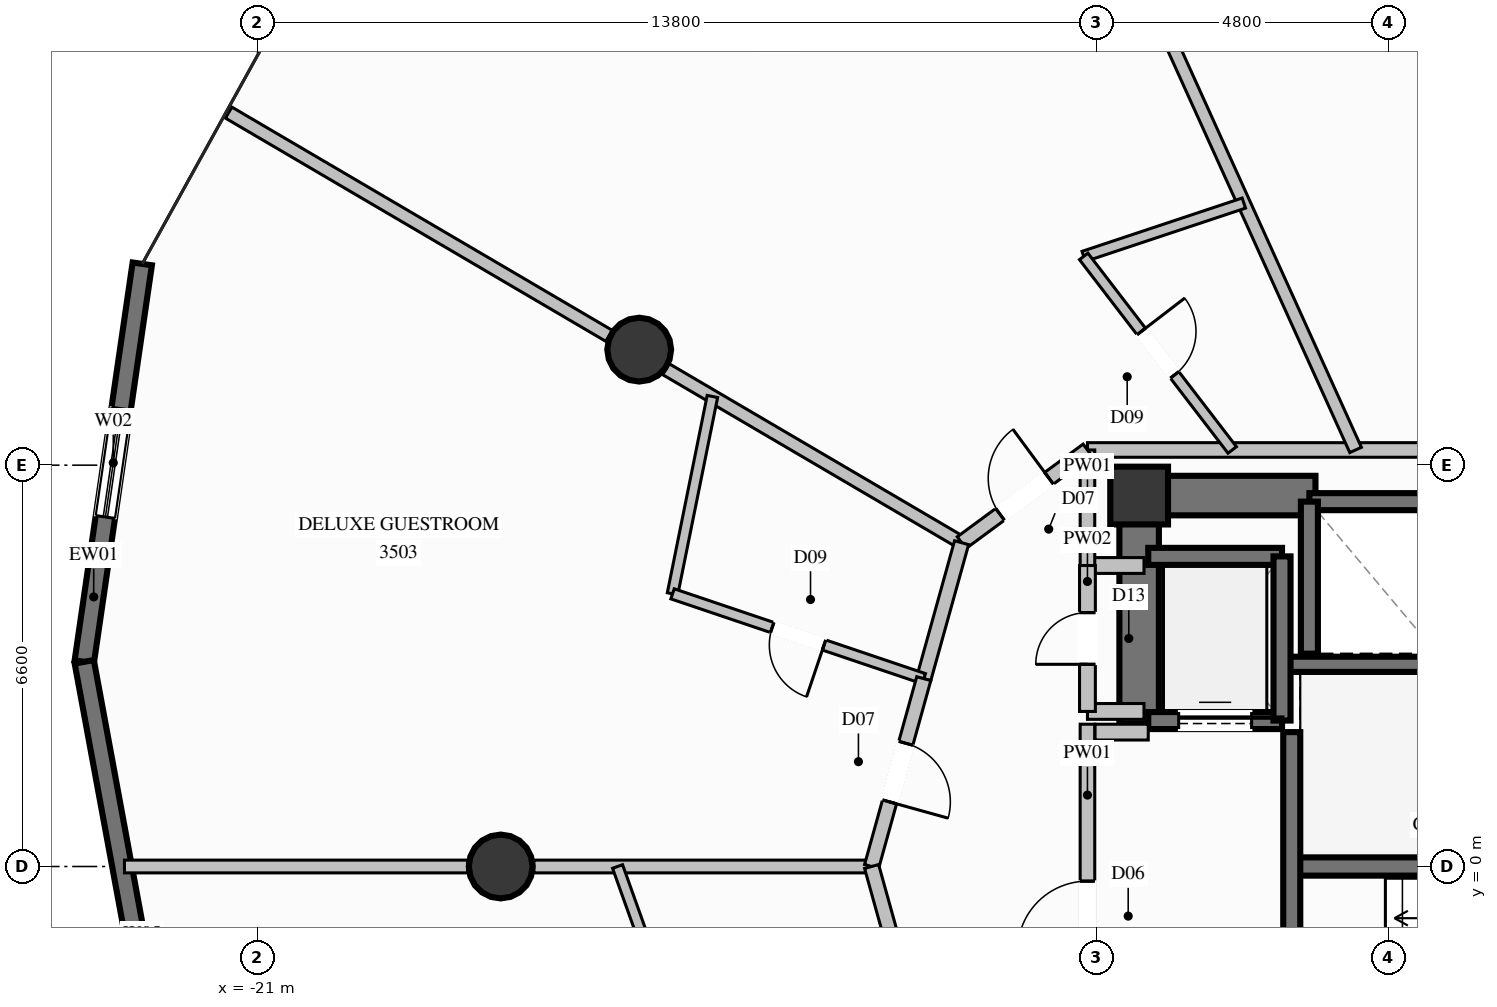
"""IFC4 building model, lengths in metres.
Left out: names, types, materials, properties, quantities, classifications, styles, units other than length and angle.
Written with IfcOpenShell. Run it as: python <this file> out.ifc"""

import sys

from ifc_helpers import new_model, si_unit, direction, frame, frame_2d, origin, origin_2d, place, context, subcontext, project, spatial, rectangle, circle, extrude, element, fill, save


model = new_model("IFC4")
c1 = context("Model", 3, precision=1e-05, world=origin(), true_north=direction((0.0, 1.0)))
c2 = subcontext(c1, "Body", "Model", "MODEL_VIEW")
j1 = project(units=[si_unit("LENGTHUNIT", "METRE"), si_unit("PLANEANGLEUNIT", "RADIAN")], contexts=[c1])
p1 = place(None, origin())
s1 = spatial("IfcSite", under=j1, at=p1, CompositionType="ELEMENT")
p2 = place(p1, origin())
s2 = spatial("IfcBuilding", under=s1, at=p2, CompositionType="ELEMENT")
p3 = place(p2, frame((0.0, 0.0, 131.4)))
s3 = spatial("IfcBuildingStorey", under=s2, at=p3, CompositionType="ELEMENT", Elevation=131.4)
p4 = place(p3, frame((-6.5, 6.1, 0.0), z_axis=(0.0, 0.0, 1.0), x_axis=(1.0, 0.0, 0.0)))
e1 = element("IfcColumn", 1, at=p4, inside=s3, PredefinedType="COLUMN", context=c2, shape_type="SweptSolid", body=[
    extrude(rectangle(XDim=0.95, YDim=0.95, at=origin_2d()), origin(), (0.0, 0.0, 1.0), 3.6),
])
p5 = place(p3, frame((-3.99, 0.0, 0.0), z_axis=(0.0, 0.0, 1.0), x_axis=(1.0, 0.0, 0.0)))
e2 = element("IfcWall", 2, at=p5, inside=s3, PredefinedType="SHEAR", context=c2, shape_type="SweptSolid", body=[
    extrude(rectangle(XDim=7.98, YDim=0.3, at=frame_2d((3.99, 0.0))), origin(), (0.0, 0.0, 1.0), 3.6),
])
p6 = place(p3, frame((-4.13, 3.325, 0.0), z_axis=(0.0, 0.0, 1.0), x_axis=(1.0, 0.0, 0.0)))
e3 = element("IfcWall", 3, at=p6, inside=s3, PredefinedType="SOLIDWALL", context=c2, shape_type="SweptSolid", body=[
    extrude(rectangle(XDim=8.26, YDim=0.25, at=frame_2d((4.13, 0.0))), origin(), (0.0, 0.0, 1.0), 3.6),
])
p7 = place(p3, frame((-6.175, 6.1, 0.0), z_axis=(0.0, 0.0, 1.0), x_axis=(1.0, 0.0, 0.0)))
e4 = element("IfcWall", 4, at=p7, inside=s3, PredefinedType="SHEAR", context=c2, shape_type="SweptSolid", body=[
    extrude(rectangle(XDim=2.575, YDim=0.65, at=frame_2d((1.288, 0.0))), origin(), (0.0, 0.0, 1.0), 3.6),
])
p8 = place(p3, frame((-6.5, 2.35, 0.0), z_axis=(0.0, 0.0, 1.0), x_axis=(0.0, 1.0, 0.0)))
e5 = element("IfcWall", 5, at=p8, inside=s3, PredefinedType="SHEAR", context=c2, shape_type="SweptSolid", body=[
    extrude(rectangle(XDim=4.075, YDim=0.65, at=frame_2d((2.038, 0.0))), origin(), (0.0, 0.0, 1.0), 3.6),
])
for number, where, z_axis, x_axis in (
    (6, (-14.722, 8.5, 0.0), (0.0, 0.0, 1.0), (1.0, 0.0, 0.0)),
    (7, (-17.0, 0.0, 0.0), (0.0, 0.0, 1.0), (1.0, 0.0, 0.0)),
):
    element("IfcColumn", number, at=place(p3, frame(where, z_axis=z_axis, x_axis=x_axis)), inside=s3, PredefinedType="COLUMN", context=c2, shape_type="SweptSolid", body=[
        extrude(circle(Radius=0.525, at=origin_2d()), origin(), (0.0, 0.0, 1.0), 3.6),
    ])
p9 = place(p3, frame((-23.849, 3.366, 0.0), z_axis=(0.0, 0.0, 1.0), x_axis=(0.144273756633, 0.989537812894, 0.0)))
e8 = element("IfcWall", 8, at=p9, inside=s3, PredefinedType="SOLIDWALL", context=c2, shape_type="SweptSolid", body=[
    extrude(rectangle(XDim=6.613, YDim=0.32, at=frame_2d((3.307, 0.0))), origin(), (0.0, 0.0, 1.0), 3.35),
])
p10 = place(p9, frame((2.407, 0.0, 0.35)))
e9 = element("IfcOpeningElement", 9, at=p10, cuts=e8, PredefinedType="OPENING", context=c2, shape_type="SweptSolid", body=[
    extrude(rectangle(XDim=1.8, YDim=2.6, at=frame_2d((0.9, 1.3))), frame((0.0, 0.17, 0.0), z_axis=(0.0, -1.0, 0.0), x_axis=(1.0, 0.0, 0.0)), (0.0, 0.0, 1.0), 0.34),
])
p11 = place(p3, frame((-22.58, -3.507, 0.0), z_axis=(0.0, 0.0, 1.0), x_axis=(-0.181571385037, 0.983377766749, 0.0)))
e10 = element("IfcWall", 10, at=p11, inside=s3, PredefinedType="SOLIDWALL", context=c2, shape_type="SweptSolid", body=[
    extrude(rectangle(XDim=6.989, YDim=0.32, at=frame_2d((3.495, 0.0))), origin(), (0.0, 0.0, 1.0), 3.35),
])
p12 = place(p11, frame((0.98, 0.0, 0.85)))
e11 = element("IfcOpeningElement", 11, at=p12, cuts=e10, PredefinedType="OPENING", context=c2, shape_type="SweptSolid", body=[
    extrude(rectangle(XDim=1.5, YDim=1.2, at=frame_2d((0.75, 0.6))), frame((0.0, 0.17, 0.0), z_axis=(0.0, -1.0, 0.0), x_axis=(1.0, 0.0, 0.0)), (0.0, 0.0, 1.0), 0.34),
])
p13 = place(p3, frame((-1.6, 6.0, 0.0), z_axis=(0.0, 0.0, 1.0), x_axis=(-1.0, 0.0, 0.0)))
e12 = element("IfcWall", 12, at=p13, inside=s3, PredefinedType="SOLIDWALL", context=c2, shape_type="SweptSolid", body=[
    extrude(rectangle(XDim=2.1, YDim=0.28, at=frame_2d((1.05, 0.0))), origin(), (0.0, 0.0, 1.0), 3.35),
])
p14 = place(p3, frame((-3.7, 6.0, 0.0), z_axis=(0.0, 0.0, 1.0), x_axis=(0.0, -1.0, 0.0)))
e13 = element("IfcWall", 13, at=p14, inside=s3, PredefinedType="SOLIDWALL", context=c2, shape_type="SweptSolid", body=[
    extrude(rectangle(XDim=2.5, YDim=0.28, at=frame_2d((1.25, 0.0))), origin(), (0.0, 0.0, 1.0), 3.35),
])
p15 = place(p3, frame((-6.35, 2.4, 0.0), z_axis=(0.0, 0.0, 1.0), x_axis=(1.0, 0.0, 0.0)))
e14 = element("IfcWall", 14, at=p15, inside=s3, PredefinedType="SOLIDWALL", context=c2, shape_type="SweptSolid", body=[
    extrude(rectangle(XDim=2.2, YDim=0.28, at=frame_2d((1.1, 0.0))), origin(), (0.0, 0.0, 1.0), 3.35),
])
p16 = place(p15, frame((0.5, 0.0, 0.0)))
e15 = element("IfcOpeningElement", 15, at=p16, cuts=e14, PredefinedType="OPENING", context=c2, shape_type="SweptSolid", body=[
    extrude(rectangle(XDim=1.2, YDim=2.2, at=frame_2d((0.6, 1.1))), frame((0.0, 0.15, 0.0), z_axis=(0.0, -1.0, 0.0), x_axis=(1.0, 0.0, 0.0)), (0.0, 0.0, 1.0), 0.3),
])
p17 = place(p3, frame((-4.15, 5.1, 0.0), z_axis=(0.0, 0.0, 1.0), x_axis=(-1.0, 0.0, 0.0)))
e16 = element("IfcWall", 16, at=p17, inside=s3, PredefinedType="SOLIDWALL", context=c2, shape_type="SweptSolid", body=[
    extrude(rectangle(XDim=2.2, YDim=0.28, at=frame_2d((1.1, 0.0))), origin(), (0.0, 0.0, 1.0), 3.35),
])
p18 = place(p3, frame((-4.15, 2.4, 0.0), z_axis=(0.0, 0.0, 1.0), x_axis=(0.0, 1.0, 0.0)))
e17 = element("IfcWall", 17, at=p18, inside=s3, PredefinedType="SOLIDWALL", context=c2, shape_type="SweptSolid", body=[
    extrude(rectangle(XDim=2.7, YDim=0.28, at=frame_2d((1.35, 0.0))), origin(), (0.0, 0.0, 1.0), 3.35),
])
p19 = place(p3, frame((-3.99, -3.25, 0.0), z_axis=(0.0, 0.0, 1.0), x_axis=(0.0, 1.0, 0.0)))
e18 = element("IfcWall", 18, at=p19, inside=s3, PredefinedType="SOLIDWALL", context=c2, shape_type="SweptSolid", body=[
    extrude(rectangle(XDim=5.46, YDim=0.28, at=frame_2d((2.73, 0.0))), origin(), (0.0, 0.0, 1.0), 3.35),
])
p20 = place(p19, frame((0.937, 0.0, 0.0)))
e19 = element("IfcOpeningElement", 19, at=p20, cuts=e18, PredefinedType="OPENING", context=c2, shape_type="SweptSolid", body=[
    extrude(rectangle(XDim=1.2, YDim=2.2, at=frame_2d((0.6, 1.1))), frame((0.0, 0.15, 0.0), z_axis=(0.0, -1.0, 0.0), x_axis=(1.0, 0.0, 0.0)), (0.0, 0.0, 1.0), 0.3),
])
p21 = place(p3, frame((-7.35, -2.78, 0.0), z_axis=(0.0, 0.0, 1.0), x_axis=(0.0, 1.0, 0.0)))
e20 = element("IfcWall", 20, at=p21, inside=s3, PredefinedType="PARTITIONING", context=c2, shape_type="SweptSolid", body=[
    extrude(rectangle(XDim=5.12, YDim=0.24, at=frame_2d((2.56, 0.0))), origin(), (0.0, 0.0, 1.0), 2.435),
])
p22 = place(p21, frame((1.389, 0.0, 0.0)))
e21 = element("IfcOpeningElement", 21, at=p22, cuts=e20, PredefinedType="OPENING", context=c2, shape_type="SweptSolid", body=[
    extrude(rectangle(XDim=1.15, YDim=2.2, at=frame_2d((0.575, 1.1))), frame((0.0, 0.13, 0.0), z_axis=(0.0, -1.0, 0.0), x_axis=(1.0, 0.0, 0.0)), (0.0, 0.0, 1.0), 0.26),
])
p23 = place(p3, frame((-7.225, 2.21, 0.0), z_axis=(0.0, 0.0, 1.0), x_axis=(1.0, 0.0, 0.0)))
e22 = element("IfcWall", 22, at=p23, inside=s3, PredefinedType="PARTITIONING", context=c2, shape_type="SweptSolid", body=[
    extrude(rectangle(XDim=0.875, YDim=0.26, at=frame_2d((0.438, 0.0))), origin(), (0.0, 0.0, 1.0), 3.35),
])
for number, where, z_axis, x_axis in (
    (23, (-7.35, 4.95, 0.0), (0.0, 0.0, 1.0), (1.0, 0.0, 0.0)),
    (24, (-7.35, 2.55, 0.0), (0.0, 0.0, 1.0), (1.0, 0.0, 0.0)),
):
    element("IfcWall", number, at=place(p3, frame(where, z_axis=z_axis, x_axis=x_axis)), inside=s3, PredefinedType="PARTITIONING", context=c2, shape_type="SweptSolid", body=[
        extrude(rectangle(XDim=0.93, YDim=0.26, at=frame_2d((0.465, 0.0))), origin(), (0.0, 0.0, 1.0), 3.35),
    ])
p24 = place(p3, frame((-7.35, 2.55, 0.0), z_axis=(0.0, 0.0, 1.0), x_axis=(0.0, 1.0, 0.0)))
e25 = element("IfcWall", 25, at=p24, inside=s3, PredefinedType="PARTITIONING", context=c2, shape_type="SweptSolid", body=[
    extrude(rectangle(XDim=2.4, YDim=0.26, at=frame_2d((1.2, 0.0))), origin(), (0.0, 0.0, 1.0), 2.435),
])
p25 = place(p24, frame((0.775, 0.0, 0.0)))
e26 = element("IfcOpeningElement", 26, at=p25, cuts=e25, PredefinedType="OPENING", context=c2, shape_type="SweptSolid", body=[
    extrude(rectangle(XDim=0.85, YDim=2.05, at=frame_2d((0.425, 1.025))), frame((0.0, 0.14, 0.0), z_axis=(0.0, -1.0, 0.0), x_axis=(1.0, 0.0, 0.0)), (0.0, 0.0, 1.0), 0.28),
])
p26 = place(p3, frame((-7.35, 6.85, 0.0), z_axis=(0.0, 0.0, 1.0), x_axis=(1.0, 0.0, 0.0)))
e27 = element("IfcWall", 27, at=p26, inside=s3, PredefinedType="PARTITIONING", context=c2, shape_type="SweptSolid", body=[
    extrude(rectangle(XDim=14.7, YDim=0.24, at=frame_2d((7.35, 0.0))), origin(), (0.0, 0.0, 1.0), 2.435),
])
p27 = place(p3, frame((-7.35, 4.95, 0.0), z_axis=(0.0, 0.0, 1.0), x_axis=(0.0, 1.0, 0.0)))
e28 = element("IfcWall", 28, at=p27, inside=s3, PredefinedType="PARTITIONING", context=c2, shape_type="SweptSolid", body=[
    extrude(rectangle(XDim=1.9, YDim=0.24, at=frame_2d((0.95, 0.0))), origin(), (0.0, 0.0, 1.0), 2.435),
])
p28 = place(p3, frame((-9.42, 5.325, 0.0), z_axis=(0.0, 0.0, 1.0), x_axis=(-0.862477017481, 0.506096230293, 0.0)))
e29 = element("IfcWall", 29, at=p28, inside=s3, PredefinedType="PARTITIONING", context=c2, shape_type="SweptSolid", body=[
    extrude(rectangle(XDim=5.637, YDim=0.21, at=frame_2d((2.819, 0.0))), origin(), (0.0, 0.0, 1.0), 2.791),
])
p29 = place(p3, frame((-15.218, 8.727, 0.0), z_axis=(0.0, 0.0, 1.0), x_axis=(-0.862485729763, 0.50608138274, 0.0)))
e30 = element("IfcWall", 30, at=p29, inside=s3, PredefinedType="PARTITIONING", context=c2, shape_type="SweptSolid", body=[
    extrude(rectangle(XDim=7.254, YDim=0.21, at=frame_2d((3.627, 0.0))), origin(), (0.0, 0.0, 1.0), 3.35),
])
p30 = place(p3, frame((-10.9, 0.0, 0.0), z_axis=(0.0, 0.0, 1.0), x_axis=(-1.0, 0.0, 0.0)))
e31 = element("IfcWall", 31, at=p30, inside=s3, PredefinedType="PARTITIONING", context=c2, shape_type="SweptSolid", body=[
    extrude(rectangle(XDim=5.555, YDim=0.21, at=frame_2d((2.778, 0.0))), origin(), (0.0, 0.0, 1.0), 3.35),
])
p31 = place(p3, frame((-17.545, 0.0, 0.0), z_axis=(0.0, 0.0, 1.0), x_axis=(-1.0, 0.0, 0.0)))
e32 = element("IfcWall", 32, at=p31, inside=s3, PredefinedType="PARTITIONING", context=c2, shape_type="SweptSolid", body=[
    extrude(rectangle(XDim=5.643, YDim=0.21, at=frame_2d((2.822, 0.0))), origin(), (0.0, 0.0, 1.0), 3.35),
])
p32 = place(p3, frame((-2.94, 6.85, 0.0), z_axis=(0.0, 0.0, 1.0), x_axis=(-0.412490983748, 0.910961683238, 0.0)))
e33 = element("IfcWall", 33, at=p32, inside=s3, PredefinedType="PARTITIONING", context=c2, shape_type="SweptSolid", body=[
    extrude(rectangle(XDim=15.918, YDim=0.21, at=frame_2d((7.959, 0.0))), origin(), (0.0, 0.0, 1.0), 3.35),
])
p33 = place(p3, frame((-7.412, 10.033, 0.0), z_axis=(0.0, 0.0, 1.0), x_axis=(0.948797559609, 0.315884774689, 0.0)))
e34 = element("IfcWall", 34, at=p33, inside=s3, PredefinedType="PLUMBINGWALL", context=c2, shape_type="SweptSolid", body=[
    extrude(rectangle(XDim=2.776, YDim=0.175, at=frame_2d((1.388, 0.0))), origin(), (0.0, 0.0, 1.0), 2.985),
])
p34 = place(p3, frame((-7.412, 10.033, 0.0), z_axis=(0.0, 0.0, 1.0), x_axis=(0.608890025588, -0.793254648105, 0.0)))
e35 = element("IfcWall", 35, at=p34, inside=s3, PredefinedType="PLUMBINGWALL", context=c2, shape_type="SweptSolid", body=[
    extrude(rectangle(XDim=4.012, YDim=0.175, at=frame_2d((2.006, 0.0))), origin(), (0.0, 0.0, 1.0), 2.791),
])
p35 = place(p34, frame((1.556, 0.0, 0.0)))
e36 = element("IfcOpeningElement", 36, at=p35, cuts=e35, PredefinedType="OPENING", context=c2, shape_type="SweptSolid", body=[
    extrude(rectangle(XDim=0.9, YDim=2.1, at=frame_2d((0.45, 1.05))), frame((0.0, 0.098, 0.0), z_axis=(0.0, -1.0, 0.0), x_axis=(1.0, 0.0, 0.0)), (0.0, 0.0, 1.0), 0.195),
])
p36 = place(p3, frame((-9.42, 5.325, 0.0), z_axis=(0.0, 0.0, 1.0), x_axis=(0.805053450612, 0.593202277185, 0.0)))
e37 = element("IfcWall", 37, at=p36, inside=s3, PredefinedType="PARTITIONING", context=c2, shape_type="SweptSolid", body=[
    extrude(rectangle(XDim=2.571, YDim=0.24, at=frame_2d((1.286, 0.0))), origin(), (0.0, 0.0, 1.0), 3.35),
])
p37 = place(p36, frame((0.786, 0.0, 0.0)))
e38 = element("IfcOpeningElement", 38, at=p37, cuts=e37, PredefinedType="OPENING", context=c2, shape_type="SweptSolid", body=[
    extrude(rectangle(XDim=1.0, YDim=2.2, at=frame_2d((0.5, 1.1))), frame((0.0, 0.13, 0.0), z_axis=(0.0, -1.0, 0.0), x_axis=(1.0, 0.0, 0.0)), (0.0, 0.0, 1.0), 0.26),
])
p38 = place(p3, frame((-9.42, 5.325, 0.0), z_axis=(0.0, 0.0, 1.0), x_axis=(-0.268045342481, -0.963406297662, 0.0)))
e39 = element("IfcWall", 39, at=p38, inside=s3, PredefinedType="PARTITIONING", context=c2, shape_type="SweptSolid", body=[
    extrude(rectangle(XDim=2.321, YDim=0.24, at=frame_2d((1.16, 0.0))), origin(), (0.0, 0.0, 1.0), 3.35),
])
p39 = place(p3, frame((-13.518, 7.73, 0.0), z_axis=(0.0, 0.0, 1.0), x_axis=(-0.198086338377, -0.980184575755, 0.0)))
e40 = element("IfcWall", 40, at=p39, inside=s3, PredefinedType="PLUMBINGWALL", context=c2, shape_type="SweptSolid", body=[
    extrude(rectangle(XDim=3.312, YDim=0.175, at=frame_2d((1.656, 0.0))), origin(), (0.0, 0.0, 1.0), 3.35),
])
p40 = place(p3, frame((-10.042, 3.089, 0.0), z_axis=(0.0, 0.0, 1.0), x_axis=(-0.947478496839, 0.319819477249, 0.0)))
e41 = element("IfcWall", 41, at=p40, inside=s3, PredefinedType="PLUMBINGWALL", context=c2, shape_type="SweptSolid", body=[
    extrude(rectangle(XDim=4.361, YDim=0.175, at=frame_2d((2.181, 0.0))), origin(), (0.0, 0.0, 1.0), 3.35),
])
p41 = place(p40, frame((1.731, 0.0, 0.0)))
e42 = element("IfcOpeningElement", 42, at=p41, cuts=e41, PredefinedType="OPENING", context=c2, shape_type="SweptSolid", body=[
    extrude(rectangle(XDim=0.9, YDim=2.1, at=frame_2d((0.45, 1.05))), frame((0.0, 0.098, 0.0), z_axis=(0.0, -1.0, 0.0), x_axis=(1.0, 0.0, 0.0)), (0.0, 0.0, 1.0), 0.195),
])
p42 = place(p3, frame((-10.042, 3.089, 0.0), z_axis=(0.0, 0.0, 1.0), x_axis=(-0.267592805492, -0.963532091032, 0.0)))
e43 = element("IfcWall", 43, at=p42, inside=s3, PredefinedType="PARTITIONING", context=c2, shape_type="SweptSolid", body=[
    extrude(rectangle(XDim=3.206, YDim=0.24, at=frame_2d((1.603, 0.0))), origin(), (0.0, 0.0, 1.0), 3.35),
])
p43 = place(p42, frame((1.103, 0.0, 0.0)))
e44 = element("IfcOpeningElement", 44, at=p43, cuts=e43, PredefinedType="OPENING", context=c2, shape_type="SweptSolid", body=[
    extrude(rectangle(XDim=1.0, YDim=2.2, at=frame_2d((0.5, 1.1))), frame((0.0, 0.13, 0.0), z_axis=(0.0, -1.0, 0.0), x_axis=(1.0, 0.0, 0.0)), (0.0, 0.0, 1.0), 0.26),
])
p44 = place(p3, frame((-10.9, 0.0, 0.0), z_axis=(0.0, 0.0, 1.0), x_axis=(0.267920543299, -0.963441011416, 0.0)))
e45 = element("IfcWall", 45, at=p44, inside=s3, PredefinedType="PARTITIONING", context=c2, shape_type="SweptSolid", body=[
    extrude(rectangle(XDim=2.321, YDim=0.24, at=frame_2d((1.161, 0.0))), origin(), (0.0, 0.0, 1.0), 3.35),
])
p45 = place(p3, frame((-15.078, 0.0, 0.0), z_axis=(0.0, 0.0, 1.0), x_axis=(0.336656350005, -0.941627581373, 0.0)))
e46 = element("IfcWall", 46, at=p45, inside=s3, PredefinedType="PLUMBINGWALL", context=c2, shape_type="SweptSolid", body=[
    extrude(rectangle(XDim=3.19, YDim=0.175, at=frame_2d((1.595, 0.0))), origin(), (0.0, 0.0, 1.0), 3.35),
])
p46 = place(p10, origin())
e47 = element("IfcWindow", 47, at=p46, inside=s3, PartitioningType="SINGLE_PANEL", PredefinedType="WINDOW", context=c2, shape_type="SweptSolid", body=[
    extrude(rectangle(XDim=1.8, YDim=2.6, at=frame_2d((0.9, 1.3))), frame((0.0, 0.03, 0.0), z_axis=(0.0, -1.0, 0.0), x_axis=(1.0, 0.0, 0.0)), (0.0, 0.0, 1.0), 0.06),
])
fill(e9, e47)
p47 = place(p16, origin())
e48 = element("IfcDoor", 48, at=p47, inside=s3, OperationType="SLIDING_TO_LEFT", PredefinedType="DOOR", context=c2, shape_type="SweptSolid", body=[
    extrude(rectangle(XDim=1.2, YDim=2.2, at=frame_2d((0.6, 1.1))), frame((0.0, 0.025, 0.0), z_axis=(0.0, -1.0, 0.0), x_axis=(1.0, 0.0, 0.0)), (0.0, 0.0, 1.0), 0.05),
])
fill(e15, e48)
p48 = place(p22, origin())
e49 = element("IfcDoor", 49, at=p48, inside=s3, OperationType="SINGLE_SWING_LEFT", PredefinedType="DOOR", context=c2, shape_type="SweptSolid", body=[
    extrude(rectangle(XDim=1.15, YDim=2.2, at=frame_2d((0.575, 1.1))), frame((0.0, 0.025, 0.0), z_axis=(0.0, -1.0, 0.0), x_axis=(1.0, 0.0, 0.0)), (0.0, 0.0, 1.0), 0.05),
])
fill(e21, e49)
p49 = place(p25, origin())
e50 = element("IfcDoor", 50, at=p49, inside=s3, OperationType="SINGLE_SWING_LEFT", PredefinedType="DOOR", context=c2, shape_type="SweptSolid", body=[
    extrude(rectangle(XDim=0.85, YDim=2.05, at=frame_2d((0.425, 1.025))), frame((0.0, 0.025, 0.0), z_axis=(0.0, -1.0, 0.0), x_axis=(1.0, 0.0, 0.0)), (0.0, 0.0, 1.0), 0.05),
])
fill(e26, e50)
p50 = place(p35, origin())
e51 = element("IfcDoor", 51, at=p50, inside=s3, OperationType="SINGLE_SWING_LEFT", PredefinedType="DOOR", context=c2, shape_type="SweptSolid", body=[
    extrude(rectangle(XDim=0.9, YDim=2.1, at=frame_2d((0.45, 1.05))), frame((0.0, 0.025, 0.0), z_axis=(0.0, -1.0, 0.0), x_axis=(1.0, 0.0, 0.0)), (0.0, 0.0, 1.0), 0.05),
])
fill(e36, e51)
p51 = place(p37, origin())
e52 = element("IfcDoor", 52, at=p51, inside=s3, OperationType="SINGLE_SWING_RIGHT", PredefinedType="DOOR", context=c2, shape_type="SweptSolid", body=[
    extrude(rectangle(XDim=1.0, YDim=2.2, at=frame_2d((0.5, 1.1))), frame((0.0, 0.025, 0.0), z_axis=(0.0, -1.0, 0.0), x_axis=(1.0, 0.0, 0.0)), (0.0, 0.0, 1.0), 0.05),
])
fill(e38, e52)
p52 = place(p41, origin())
e53 = element("IfcDoor", 53, at=p52, inside=s3, OperationType="SINGLE_SWING_LEFT", PredefinedType="DOOR", context=c2, shape_type="SweptSolid", body=[
    extrude(rectangle(XDim=0.9, YDim=2.1, at=frame_2d((0.45, 1.05))), frame((0.0, 0.025, 0.0), z_axis=(0.0, -1.0, 0.0), x_axis=(1.0, 0.0, 0.0)), (0.0, 0.0, 1.0), 0.05),
])
fill(e42, e53)
p53 = place(p43, origin())
e54 = element("IfcDoor", 54, at=p53, inside=s3, OperationType="SINGLE_SWING_RIGHT", PredefinedType="DOOR", context=c2, shape_type="SweptSolid", body=[
    extrude(rectangle(XDim=1.0, YDim=2.2, at=frame_2d((0.5, 1.1))), frame((0.0, 0.025, 0.0), z_axis=(0.0, -1.0, 0.0), x_axis=(1.0, 0.0, 0.0)), (0.0, 0.0, 1.0), 0.05),
])
fill(e44, e54)
save(model, sys.argv[1])
